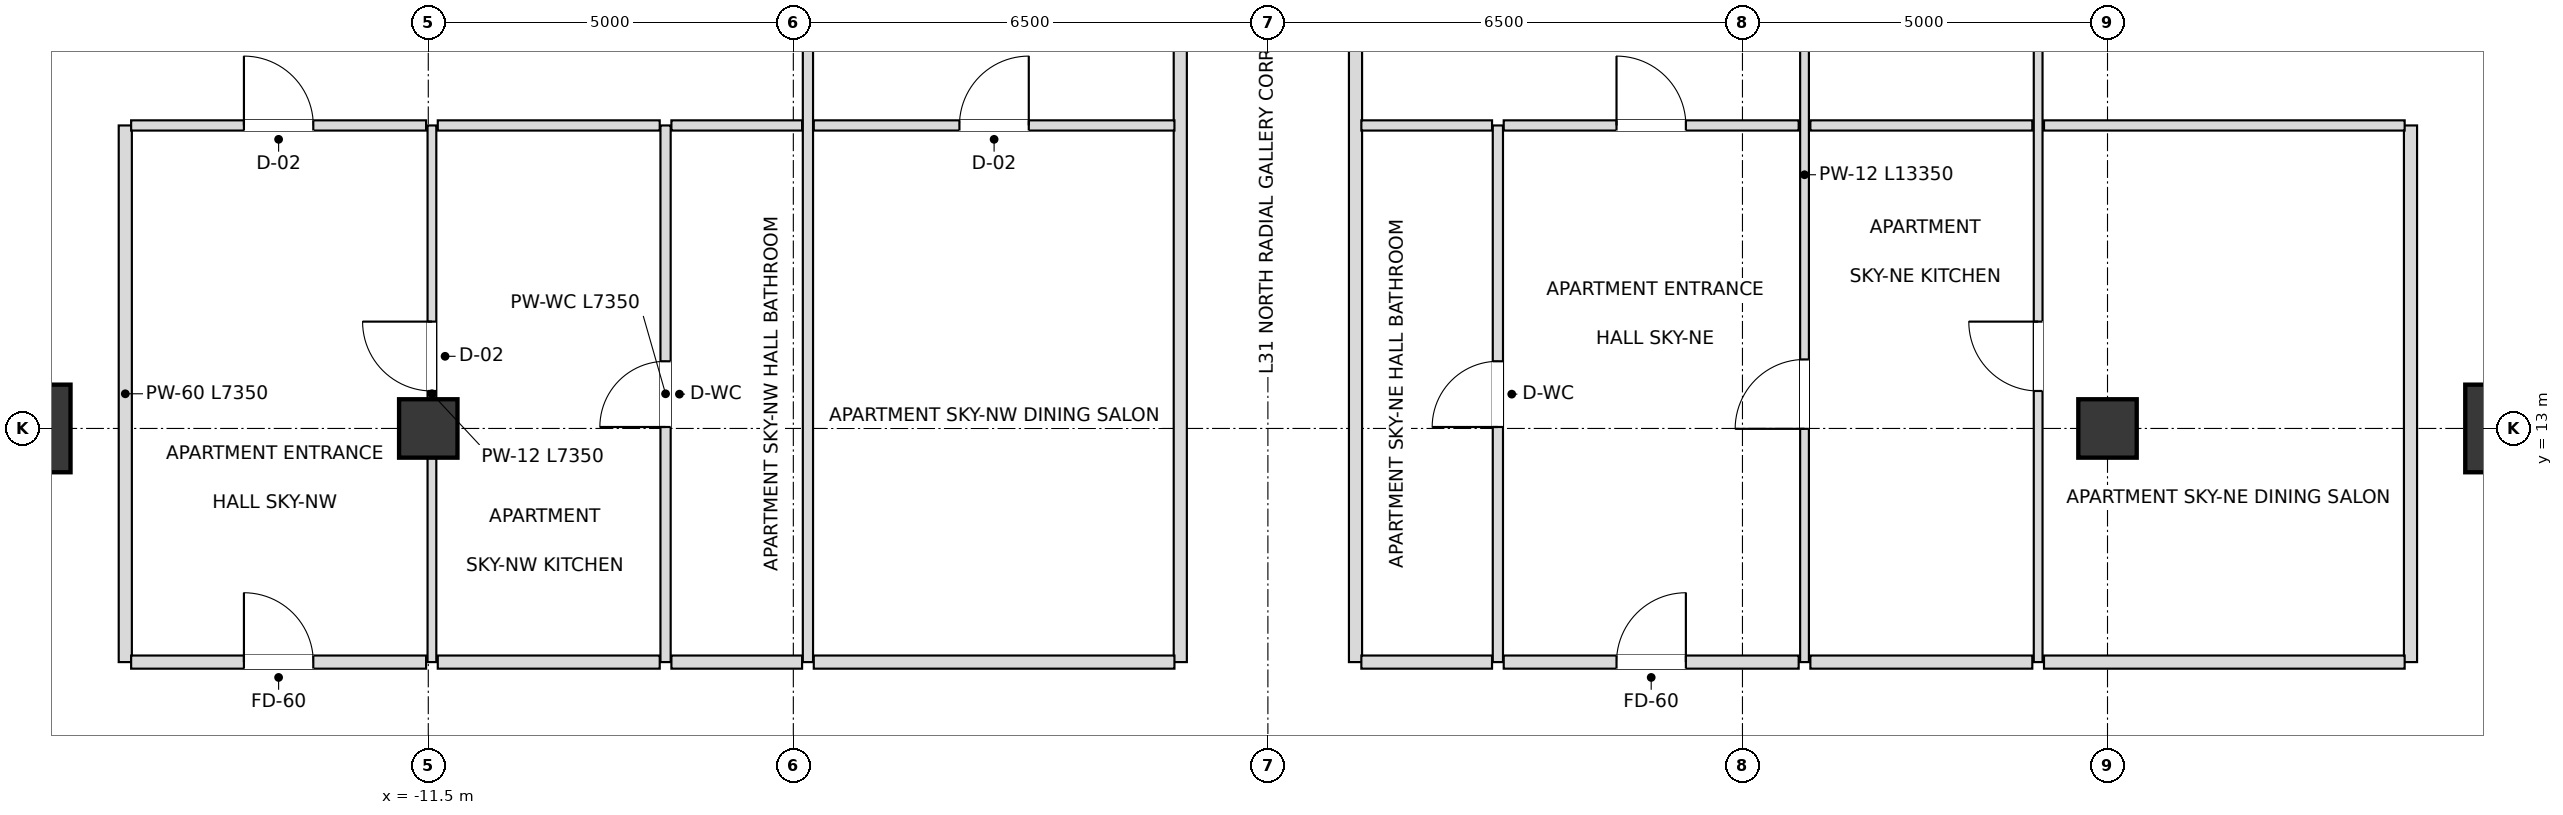
"""IFC4 building model, lengths in metres.
Left out: names, types, materials, properties, quantities, classifications, styles, units other than length and angle.
Written with IfcOpenShell. Run it as: python <this file> out.ifc"""

import sys

from ifc_helpers import new_model, si_unit, direction, frame, frame_2d, origin, origin_2d, place, context, subcontext, project, spatial, rectangle, extrude, element, fill, save


model = new_model("IFC4")
c1 = context("Model", 3, precision=1e-05, world=origin(), true_north=direction((0.0, 1.0)))
c2 = subcontext(c1, "Body", "Model", "MODEL_VIEW")
j1 = project(units=[si_unit("LENGTHUNIT", "METRE"), si_unit("PLANEANGLEUNIT", "RADIAN")], contexts=[c1])
p1 = place(None, origin())
s1 = spatial("IfcSite", under=j1, at=p1, CompositionType="ELEMENT")
p2 = place(p1, origin())
s2 = spatial("IfcBuilding", under=s1, at=p2, CompositionType="ELEMENT")
p3 = place(p2, frame((0.0, 0.0, 125.1)))
s3 = spatial("IfcBuildingStorey", under=s2, at=p3, CompositionType="ELEMENT", Elevation=125.1)
for number, where, z_axis, x_axis in (
    (1, (17.0, 13.0, 0.0), (0.0, 0.0, 1.0), (1.0, 0.0, 0.0)),
    (2, (-17.0, 13.0, 0.0), (0.0, 0.0, 1.0), (1.0, 0.0, 0.0)),
):
    element("IfcColumn", number, at=place(p3, frame(where, z_axis=z_axis, x_axis=x_axis)), inside=s3, PredefinedType="USERDEFINED", context=c2, shape_type="SweptSolid", body=[
        extrude(rectangle(XDim=1.2, YDim=1.2, at=origin_2d()), origin(), (0.0, 0.0, 1.0), 4.5),
    ])
for number, where, z_axis, x_axis in (
    (3, (-11.5, 13.0, 0.0), (0.0, 0.0, 1.0), (1.0, 0.0, 0.0)),
    (4, (11.5, 13.0, 0.0), (0.0, 0.0, 1.0), (1.0, 0.0, 0.0)),
):
    element("IfcColumn", number, at=place(p3, frame(where, z_axis=z_axis, x_axis=x_axis)), inside=s3, PredefinedType="COLUMN", context=c2, shape_type="SweptSolid", body=[
        extrude(rectangle(XDim=0.8, YDim=0.8, at=origin_2d()), origin(), (0.0, 0.0, 1.0), 4.5),
    ])
p4 = place(p3, frame((-15.65, 9.8, 0.0), z_axis=(0.0, 0.0, 1.0), x_axis=(0.0, 1.0, 0.0)))
e5 = element("IfcWall", 5, at=p4, inside=s3, PredefinedType="PARTITIONING", context=c2, shape_type="SweptSolid", body=[
    extrude(rectangle(XDim=7.35, YDim=0.18, at=frame_2d((3.675, 0.0))), origin(), (0.0, 0.0, 1.0), 3.636),
])
p5 = place(p3, frame((-11.45, 9.8, 0.0), z_axis=(0.0, 0.0, 1.0), x_axis=(0.0, 1.0, 0.0)))
e6 = element("IfcWall", 6, at=p5, inside=s3, PredefinedType="PARTITIONING", context=c2, shape_type="SweptSolid", body=[
    extrude(rectangle(XDim=7.35, YDim=0.12, at=frame_2d((3.675, 0.0))), origin(), (0.0, 0.0, 1.0), 3.636),
])
p6 = place(p5, frame((3.713, 0.0, 0.0)))
e7 = element("IfcOpeningElement", 7, at=p6, cuts=e6, PredefinedType="OPENING", context=c2, shape_type="SweptSolid", body=[
    extrude(rectangle(XDim=0.95, YDim=2.1, at=frame_2d((0.475, 1.05))), frame((0.0, 0.07, 0.0), z_axis=(0.0, -1.0, 0.0), x_axis=(1.0, 0.0, 0.0)), (0.0, 0.0, 1.0), 0.14),
])
p7 = place(p3, frame((-8.25, 9.8, 0.0), z_axis=(0.0, 0.0, 1.0), x_axis=(0.0, 1.0, 0.0)))
e8 = element("IfcWall", 8, at=p7, inside=s3, PredefinedType="PARTITIONING", context=c2, shape_type="SweptSolid", body=[
    extrude(rectangle(XDim=7.35, YDim=0.14, at=frame_2d((3.675, 0.0))), origin(), (0.0, 0.0, 1.0), 3.716),
])
p8 = place(p7, frame((3.22, 0.0, 0.0)))
e9 = element("IfcOpeningElement", 9, at=p8, cuts=e8, PredefinedType="OPENING", context=c2, shape_type="SweptSolid", body=[
    extrude(rectangle(XDim=0.9, YDim=2.1, at=frame_2d((0.45, 1.05))), frame((0.0, 0.08, 0.0), z_axis=(0.0, -1.0, 0.0), x_axis=(1.0, 0.0, 0.0)), (0.0, 0.0, 1.0), 0.16),
])
p9 = place(p3, frame((-6.3, 9.8, 0.0), z_axis=(0.0, 0.0, 1.0), x_axis=(0.0, 1.0, 0.0)))
e10 = element("IfcWall", 10, at=p9, inside=s3, PredefinedType="PARTITIONING", context=c2, shape_type="SweptSolid", body=[
    extrude(rectangle(XDim=13.35, YDim=0.14, at=frame_2d((6.675, 0.0))), origin(), (0.0, 0.0, 1.0), 3.716),
])
p10 = place(p9, frame((11.051, 0.0, 0.0)))
e11 = element("IfcOpeningElement", 11, at=p10, cuts=e10, PredefinedType="OPENING", context=c2, shape_type="SweptSolid", body=[
    extrude(rectangle(XDim=0.9, YDim=2.1, at=frame_2d((0.45, 1.05))), frame((0.0, 0.08, 0.0), z_axis=(0.0, -1.0, 0.0), x_axis=(1.0, 0.0, 0.0)), (0.0, 0.0, 1.0), 0.16),
])
for number, where, z_axis, x_axis in (
    (12, (-1.2, 9.8, 0.0), (0.0, 0.0, 1.0), (0.0, 1.0, 0.0)),
    (13, (1.2, 9.8, 0.0), (0.0, 0.0, 1.0), (0.0, 1.0, 0.0)),
):
    element("IfcWall", number, at=place(p3, frame(where, z_axis=z_axis, x_axis=x_axis)), inside=s3, PredefinedType="PARTITIONING", context=c2, shape_type="SweptSolid", body=[
        extrude(rectangle(XDim=13.35, YDim=0.18, at=frame_2d((6.675, 0.0))), origin(), (0.0, 0.0, 1.0), 3.716),
    ])
p11 = place(p3, frame((3.15, 9.8, 0.0), z_axis=(0.0, 0.0, 1.0), x_axis=(0.0, 1.0, 0.0)))
e14 = element("IfcWall", 14, at=p11, inside=s3, PredefinedType="PARTITIONING", context=c2, shape_type="SweptSolid", body=[
    extrude(rectangle(XDim=7.35, YDim=0.14, at=frame_2d((3.675, 0.0))), origin(), (0.0, 0.0, 1.0), 4.28),
])
p12 = place(p11, frame((3.22, 0.0, 0.0)))
e15 = element("IfcOpeningElement", 15, at=p12, cuts=e14, PredefinedType="OPENING", context=c2, shape_type="SweptSolid", body=[
    extrude(rectangle(XDim=0.9, YDim=2.1, at=frame_2d((0.45, 1.05))), frame((0.0, 0.08, 0.0), z_axis=(0.0, -1.0, 0.0), x_axis=(1.0, 0.0, 0.0)), (0.0, 0.0, 1.0), 0.16),
])
p13 = place(p3, frame((7.35, 9.8, 0.0), z_axis=(0.0, 0.0, 1.0), x_axis=(0.0, 1.0, 0.0)))
e16 = element("IfcWall", 16, at=p13, inside=s3, PredefinedType="PARTITIONING", context=c2, shape_type="SweptSolid", body=[
    extrude(rectangle(XDim=13.35, YDim=0.12, at=frame_2d((6.675, 0.0))), origin(), (0.0, 0.0, 1.0), 3.716),
])
p14 = place(p13, frame((3.195, 0.0, 0.0)))
e17 = element("IfcOpeningElement", 17, at=p14, cuts=e16, PredefinedType="OPENING", context=c2, shape_type="SweptSolid", body=[
    extrude(rectangle(XDim=0.95, YDim=2.1, at=frame_2d((0.475, 1.05))), frame((0.0, 0.07, 0.0), z_axis=(0.0, -1.0, 0.0), x_axis=(1.0, 0.0, 0.0)), (0.0, 0.0, 1.0), 0.14),
])
p15 = place(p13, frame((11.051, 0.0, 0.0)))
e18 = element("IfcOpeningElement", 18, at=p15, cuts=e16, PredefinedType="OPENING", context=c2, shape_type="SweptSolid", body=[
    extrude(rectangle(XDim=0.9, YDim=2.1, at=frame_2d((0.45, 1.05))), frame((0.0, 0.07, 0.0), z_axis=(0.0, -1.0, 0.0), x_axis=(1.0, 0.0, 0.0)), (0.0, 0.0, 1.0), 0.14),
])
p16 = place(p3, frame((10.55, 9.8, 0.0), z_axis=(0.0, 0.0, 1.0), x_axis=(0.0, 1.0, 0.0)))
e19 = element("IfcWall", 19, at=p16, inside=s3, PredefinedType="PARTITIONING", context=c2, shape_type="SweptSolid", body=[
    extrude(rectangle(XDim=13.35, YDim=0.12, at=frame_2d((6.675, 0.0))), origin(), (0.0, 0.0, 1.0), 3.716),
])
p17 = place(p16, frame((3.713, 0.0, 0.0)))
e20 = element("IfcOpeningElement", 20, at=p17, cuts=e19, PredefinedType="OPENING", context=c2, shape_type="SweptSolid", body=[
    extrude(rectangle(XDim=0.95, YDim=2.1, at=frame_2d((0.475, 1.05))), frame((0.0, 0.07, 0.0), z_axis=(0.0, -1.0, 0.0), x_axis=(1.0, 0.0, 0.0)), (0.0, 0.0, 1.0), 0.14),
])
p18 = place(p16, frame((11.051, 0.0, 0.0)))
e21 = element("IfcOpeningElement", 21, at=p18, cuts=e19, PredefinedType="OPENING", context=c2, shape_type="SweptSolid", body=[
    extrude(rectangle(XDim=0.9, YDim=2.1, at=frame_2d((0.45, 1.05))), frame((0.0, 0.07, 0.0), z_axis=(0.0, -1.0, 0.0), x_axis=(1.0, 0.0, 0.0)), (0.0, 0.0, 1.0), 0.14),
])
p19 = place(p3, frame((15.65, 9.8, 0.0), z_axis=(0.0, 0.0, 1.0), x_axis=(0.0, 1.0, 0.0)))
e22 = element("IfcWall", 22, at=p19, inside=s3, PredefinedType="PARTITIONING", context=c2, shape_type="SweptSolid", body=[
    extrude(rectangle(XDim=7.35, YDim=0.18, at=frame_2d((3.675, 0.0))), origin(), (0.0, 0.0, 1.0), 3.636),
])
p20 = place(p3, frame((-15.57, 9.8, 0.0), z_axis=(0.0, 0.0, 1.0), x_axis=(1.0, 0.0, 0.0)))
e23 = element("IfcWall", 23, at=p20, inside=s3, PredefinedType="PARTITIONING", context=c2, shape_type="SweptSolid", body=[
    extrude(rectangle(XDim=4.04, YDim=0.18, at=frame_2d((2.02, 0.0))), origin(), (0.0, 0.0, 1.0), 4.28),
])
p21 = place(p20, frame((1.545, 0.0, 0.0)))
e24 = element("IfcOpeningElement", 24, at=p21, cuts=e23, PredefinedType="OPENING", context=c2, shape_type="SweptSolid", body=[
    extrude(rectangle(XDim=0.95, YDim=2.15, at=frame_2d((0.475, 1.075))), frame((0.0, 0.1, 0.0), z_axis=(0.0, -1.0, 0.0), x_axis=(1.0, 0.0, 0.0)), (0.0, 0.0, 1.0), 0.2),
])
p22 = place(p3, frame((-11.37, 9.8, 0.0), z_axis=(0.0, 0.0, 1.0), x_axis=(1.0, 0.0, 0.0)))
e25 = element("IfcWall", 25, at=p22, inside=s3, PredefinedType="PARTITIONING", context=c2, shape_type="SweptSolid", body=[
    extrude(rectangle(XDim=3.04, YDim=0.18, at=frame_2d((1.52, 0.0))), origin(), (0.0, 0.0, 1.0), 4.28),
])
p23 = place(p3, frame((-8.17, 9.8, 0.0), z_axis=(0.0, 0.0, 1.0), x_axis=(1.0, 0.0, 0.0)))
e26 = element("IfcWall", 26, at=p23, inside=s3, PredefinedType="PARTITIONING", context=c2, shape_type="SweptSolid", body=[
    extrude(rectangle(XDim=1.79, YDim=0.18, at=frame_2d((0.895, 0.0))), origin(), (0.0, 0.0, 1.0), 3.716),
])
p24 = place(p3, frame((-6.22, 9.8, 0.0), z_axis=(0.0, 0.0, 1.0), x_axis=(1.0, 0.0, 0.0)))
e27 = element("IfcWall", 27, at=p24, inside=s3, PredefinedType="PARTITIONING", context=c2, shape_type="SweptSolid", body=[
    extrude(rectangle(XDim=4.94, YDim=0.18, at=frame_2d((2.47, 0.0))), origin(), (0.0, 0.0, 1.0), 4.28),
])
p25 = place(p3, frame((1.28, 9.8, 0.0), z_axis=(0.0, 0.0, 1.0), x_axis=(1.0, 0.0, 0.0)))
e28 = element("IfcWall", 28, at=p25, inside=s3, PredefinedType="PARTITIONING", context=c2, shape_type="SweptSolid", body=[
    extrude(rectangle(XDim=1.79, YDim=0.18, at=frame_2d((0.895, 0.0))), origin(), (0.0, 0.0, 1.0), 4.28),
])
p26 = place(p3, frame((3.23, 9.8, 0.0), z_axis=(0.0, 0.0, 1.0), x_axis=(1.0, 0.0, 0.0)))
e29 = element("IfcWall", 29, at=p26, inside=s3, PredefinedType="PARTITIONING", context=c2, shape_type="SweptSolid", body=[
    extrude(rectangle(XDim=4.04, YDim=0.18, at=frame_2d((2.02, 0.0))), origin(), (0.0, 0.0, 1.0), 3.716),
])
p27 = place(p26, frame((1.545, 0.0, 0.0)))
e30 = element("IfcOpeningElement", 30, at=p27, cuts=e29, PredefinedType="OPENING", context=c2, shape_type="SweptSolid", body=[
    extrude(rectangle(XDim=0.95, YDim=2.15, at=frame_2d((0.475, 1.075))), frame((0.0, 0.1, 0.0), z_axis=(0.0, -1.0, 0.0), x_axis=(1.0, 0.0, 0.0)), (0.0, 0.0, 1.0), 0.2),
])
p28 = place(p3, frame((7.43, 9.8, 0.0), z_axis=(0.0, 0.0, 1.0), x_axis=(1.0, 0.0, 0.0)))
e31 = element("IfcWall", 31, at=p28, inside=s3, PredefinedType="PARTITIONING", context=c2, shape_type="SweptSolid", body=[
    extrude(rectangle(XDim=3.04, YDim=0.18, at=frame_2d((1.52, 0.0))), origin(), (0.0, 0.0, 1.0), 4.28),
])
p29 = place(p3, frame((10.63, 9.8, 0.0), z_axis=(0.0, 0.0, 1.0), x_axis=(1.0, 0.0, 0.0)))
e32 = element("IfcWall", 32, at=p29, inside=s3, PredefinedType="PARTITIONING", context=c2, shape_type="SweptSolid", body=[
    extrude(rectangle(XDim=4.94, YDim=0.18, at=frame_2d((2.47, 0.0))), origin(), (0.0, 0.0, 1.0), 4.28),
])
p30 = place(p3, frame((-15.57, 17.15, 0.0), z_axis=(0.0, 0.0, 1.0), x_axis=(1.0, 0.0, 0.0)))
e33 = element("IfcWall", 33, at=p30, inside=s3, PredefinedType="PARTITIONING", context=c2, shape_type="SweptSolid", body=[
    extrude(rectangle(XDim=4.04, YDim=0.14, at=frame_2d((2.02, 0.0))), origin(), (0.0, 0.0, 1.0), 3.636),
])
p31 = place(p30, frame((1.545, 0.0, 0.0)))
e34 = element("IfcOpeningElement", 34, at=p31, cuts=e33, PredefinedType="OPENING", context=c2, shape_type="SweptSolid", body=[
    extrude(rectangle(XDim=0.95, YDim=2.1, at=frame_2d((0.475, 1.05))), frame((0.0, 0.08, 0.0), z_axis=(0.0, -1.0, 0.0), x_axis=(1.0, 0.0, 0.0)), (0.0, 0.0, 1.0), 0.16),
])
p32 = place(p3, frame((-11.37, 17.15, 0.0), z_axis=(0.0, 0.0, 1.0), x_axis=(1.0, 0.0, 0.0)))
e35 = element("IfcWall", 35, at=p32, inside=s3, PredefinedType="PARTITIONING", context=c2, shape_type="SweptSolid", body=[
    extrude(rectangle(XDim=3.04, YDim=0.14, at=frame_2d((1.52, 0.0))), origin(), (0.0, 0.0, 1.0), 4.28),
])
p33 = place(p3, frame((-8.17, 17.15, 0.0), z_axis=(0.0, 0.0, 1.0), x_axis=(1.0, 0.0, 0.0)))
e36 = element("IfcWall", 36, at=p33, inside=s3, PredefinedType="PARTITIONING", context=c2, shape_type="SweptSolid", body=[
    extrude(rectangle(XDim=1.79, YDim=0.14, at=frame_2d((0.895, 0.0))), origin(), (0.0, 0.0, 1.0), 3.716),
])
p34 = place(p3, frame((-6.22, 17.15, 0.0), z_axis=(0.0, 0.0, 1.0), x_axis=(1.0, 0.0, 0.0)))
e37 = element("IfcWall", 37, at=p34, inside=s3, PredefinedType="PARTITIONING", context=c2, shape_type="SweptSolid", body=[
    extrude(rectangle(XDim=4.94, YDim=0.14, at=frame_2d((2.47, 0.0))), origin(), (0.0, 0.0, 1.0), 4.28),
])
p35 = place(p34, frame((1.995, 0.0, 0.0)))
e38 = element("IfcOpeningElement", 38, at=p35, cuts=e37, PredefinedType="OPENING", context=c2, shape_type="SweptSolid", body=[
    extrude(rectangle(XDim=0.95, YDim=2.1, at=frame_2d((0.475, 1.05))), frame((0.0, 0.08, 0.0), z_axis=(0.0, -1.0, 0.0), x_axis=(1.0, 0.0, 0.0)), (0.0, 0.0, 1.0), 0.16),
])
p36 = place(p3, frame((1.28, 17.15, 0.0), z_axis=(0.0, 0.0, 1.0), x_axis=(1.0, 0.0, 0.0)))
e39 = element("IfcWall", 39, at=p36, inside=s3, PredefinedType="PARTITIONING", context=c2, shape_type="SweptSolid", body=[
    extrude(rectangle(XDim=1.79, YDim=0.14, at=frame_2d((0.895, 0.0))), origin(), (0.0, 0.0, 1.0), 4.28),
])
p37 = place(p3, frame((3.23, 17.15, 0.0), z_axis=(0.0, 0.0, 1.0), x_axis=(1.0, 0.0, 0.0)))
e40 = element("IfcWall", 40, at=p37, inside=s3, PredefinedType="PARTITIONING", context=c2, shape_type="SweptSolid", body=[
    extrude(rectangle(XDim=4.04, YDim=0.14, at=frame_2d((2.02, 0.0))), origin(), (0.0, 0.0, 1.0), 3.716),
])
p38 = place(p37, frame((1.545, 0.0, 0.0)))
e41 = element("IfcOpeningElement", 41, at=p38, cuts=e40, PredefinedType="OPENING", context=c2, shape_type="SweptSolid", body=[
    extrude(rectangle(XDim=0.95, YDim=2.1, at=frame_2d((0.475, 1.05))), frame((0.0, 0.08, 0.0), z_axis=(0.0, -1.0, 0.0), x_axis=(1.0, 0.0, 0.0)), (0.0, 0.0, 1.0), 0.16),
])
p39 = place(p3, frame((7.43, 17.15, 0.0), z_axis=(0.0, 0.0, 1.0), x_axis=(1.0, 0.0, 0.0)))
e42 = element("IfcWall", 42, at=p39, inside=s3, PredefinedType="PARTITIONING", context=c2, shape_type="SweptSolid", body=[
    extrude(rectangle(XDim=3.04, YDim=0.14, at=frame_2d((1.52, 0.0))), origin(), (0.0, 0.0, 1.0), 4.28),
])
p40 = place(p3, frame((10.63, 17.15, 0.0), z_axis=(0.0, 0.0, 1.0), x_axis=(1.0, 0.0, 0.0)))
e43 = element("IfcWall", 43, at=p40, inside=s3, PredefinedType="PARTITIONING", context=c2, shape_type="SweptSolid", body=[
    extrude(rectangle(XDim=4.94, YDim=0.14, at=frame_2d((2.47, 0.0))), origin(), (0.0, 0.0, 1.0), 3.636),
])
p41 = place(p21, origin())
e44 = element("IfcDoor", 44, at=p41, inside=s3, OperationType="SINGLE_SWING_LEFT", PredefinedType="DOOR", context=c2, shape_type="SweptSolid", body=[
    extrude(rectangle(XDim=0.95, YDim=2.15, at=frame_2d((0.475, 1.075))), frame((0.0, 0.025, 0.0), z_axis=(0.0, -1.0, 0.0), x_axis=(1.0, 0.0, 0.0)), (0.0, 0.0, 1.0), 0.05),
])
fill(e24, e44)
p42 = place(p6, origin())
e45 = element("IfcDoor", 45, at=p42, inside=s3, OperationType="SINGLE_SWING_RIGHT", PredefinedType="DOOR", context=c2, shape_type="SweptSolid", body=[
    extrude(rectangle(XDim=0.95, YDim=2.1, at=frame_2d((0.475, 1.05))), frame((0.0, 0.025, 0.0), z_axis=(0.0, -1.0, 0.0), x_axis=(1.0, 0.0, 0.0)), (0.0, 0.0, 1.0), 0.05),
])
fill(e7, e45)
p43 = place(p8, origin())
e46 = element("IfcDoor", 46, at=p43, inside=s3, OperationType="SINGLE_SWING_LEFT", PredefinedType="DOOR", context=c2, shape_type="SweptSolid", body=[
    extrude(rectangle(XDim=0.9, YDim=2.1, at=frame_2d((0.45, 1.05))), frame((0.0, 0.025, 0.0), z_axis=(0.0, -1.0, 0.0), x_axis=(1.0, 0.0, 0.0)), (0.0, 0.0, 1.0), 0.05),
])
fill(e9, e46)
p44 = place(p35, origin())
e47 = element("IfcDoor", 47, at=p44, inside=s3, OperationType="SINGLE_SWING_RIGHT", PredefinedType="DOOR", context=c2, shape_type="SweptSolid", body=[
    extrude(rectangle(XDim=0.95, YDim=2.1, at=frame_2d((0.475, 1.05))), frame((0.0, 0.025, 0.0), z_axis=(0.0, -1.0, 0.0), x_axis=(1.0, 0.0, 0.0)), (0.0, 0.0, 1.0), 0.05),
])
fill(e38, e47)
p45 = place(p31, origin())
e48 = element("IfcDoor", 48, at=p45, inside=s3, OperationType="SINGLE_SWING_LEFT", PredefinedType="DOOR", context=c2, shape_type="SweptSolid", body=[
    extrude(rectangle(XDim=0.95, YDim=2.1, at=frame_2d((0.475, 1.05))), frame((0.0, 0.025, 0.0), z_axis=(0.0, -1.0, 0.0), x_axis=(1.0, 0.0, 0.0)), (0.0, 0.0, 1.0), 0.05),
])
fill(e34, e48)
p46 = place(p12, origin())
e49 = element("IfcDoor", 49, at=p46, inside=s3, OperationType="SINGLE_SWING_LEFT", PredefinedType="DOOR", context=c2, shape_type="SweptSolid", body=[
    extrude(rectangle(XDim=0.9, YDim=2.1, at=frame_2d((0.45, 1.05))), frame((0.0, 0.025, 0.0), z_axis=(0.0, -1.0, 0.0), x_axis=(1.0, 0.0, 0.0)), (0.0, 0.0, 1.0), 0.05),
])
fill(e15, e49)
p47 = place(p27, origin())
e50 = element("IfcDoor", 50, at=p47, inside=s3, OperationType="SINGLE_SWING_RIGHT", PredefinedType="DOOR", context=c2, shape_type="SweptSolid", body=[
    extrude(rectangle(XDim=0.95, YDim=2.15, at=frame_2d((0.475, 1.075))), frame((0.0, 0.025, 0.0), z_axis=(0.0, -1.0, 0.0), x_axis=(1.0, 0.0, 0.0)), (0.0, 0.0, 1.0), 0.05),
])
fill(e30, e50)
p48 = place(p14, origin())
e51 = element("IfcDoor", 51, at=p48, inside=s3, OperationType="SINGLE_SWING_LEFT", PredefinedType="DOOR", context=c2, shape_type="SweptSolid", body=[
    extrude(rectangle(XDim=0.95, YDim=2.1, at=frame_2d((0.475, 1.05))), frame((0.0, 0.025, 0.0), z_axis=(0.0, -1.0, 0.0), x_axis=(1.0, 0.0, 0.0)), (0.0, 0.0, 1.0), 0.05),
])
fill(e17, e51)
p49 = place(p17, origin())
e52 = element("IfcDoor", 52, at=p49, inside=s3, OperationType="SINGLE_SWING_RIGHT", PredefinedType="DOOR", context=c2, shape_type="SweptSolid", body=[
    extrude(rectangle(XDim=0.95, YDim=2.1, at=frame_2d((0.475, 1.05))), frame((0.0, 0.025, 0.0), z_axis=(0.0, -1.0, 0.0), x_axis=(1.0, 0.0, 0.0)), (0.0, 0.0, 1.0), 0.05),
])
fill(e20, e52)
p50 = place(p38, origin())
e53 = element("IfcDoor", 53, at=p50, inside=s3, OperationType="SINGLE_SWING_LEFT", PredefinedType="DOOR", context=c2, shape_type="SweptSolid", body=[
    extrude(rectangle(XDim=0.95, YDim=2.1, at=frame_2d((0.475, 1.05))), frame((0.0, 0.025, 0.0), z_axis=(0.0, -1.0, 0.0), x_axis=(1.0, 0.0, 0.0)), (0.0, 0.0, 1.0), 0.05),
])
fill(e41, e53)
save(model, sys.argv[1])
